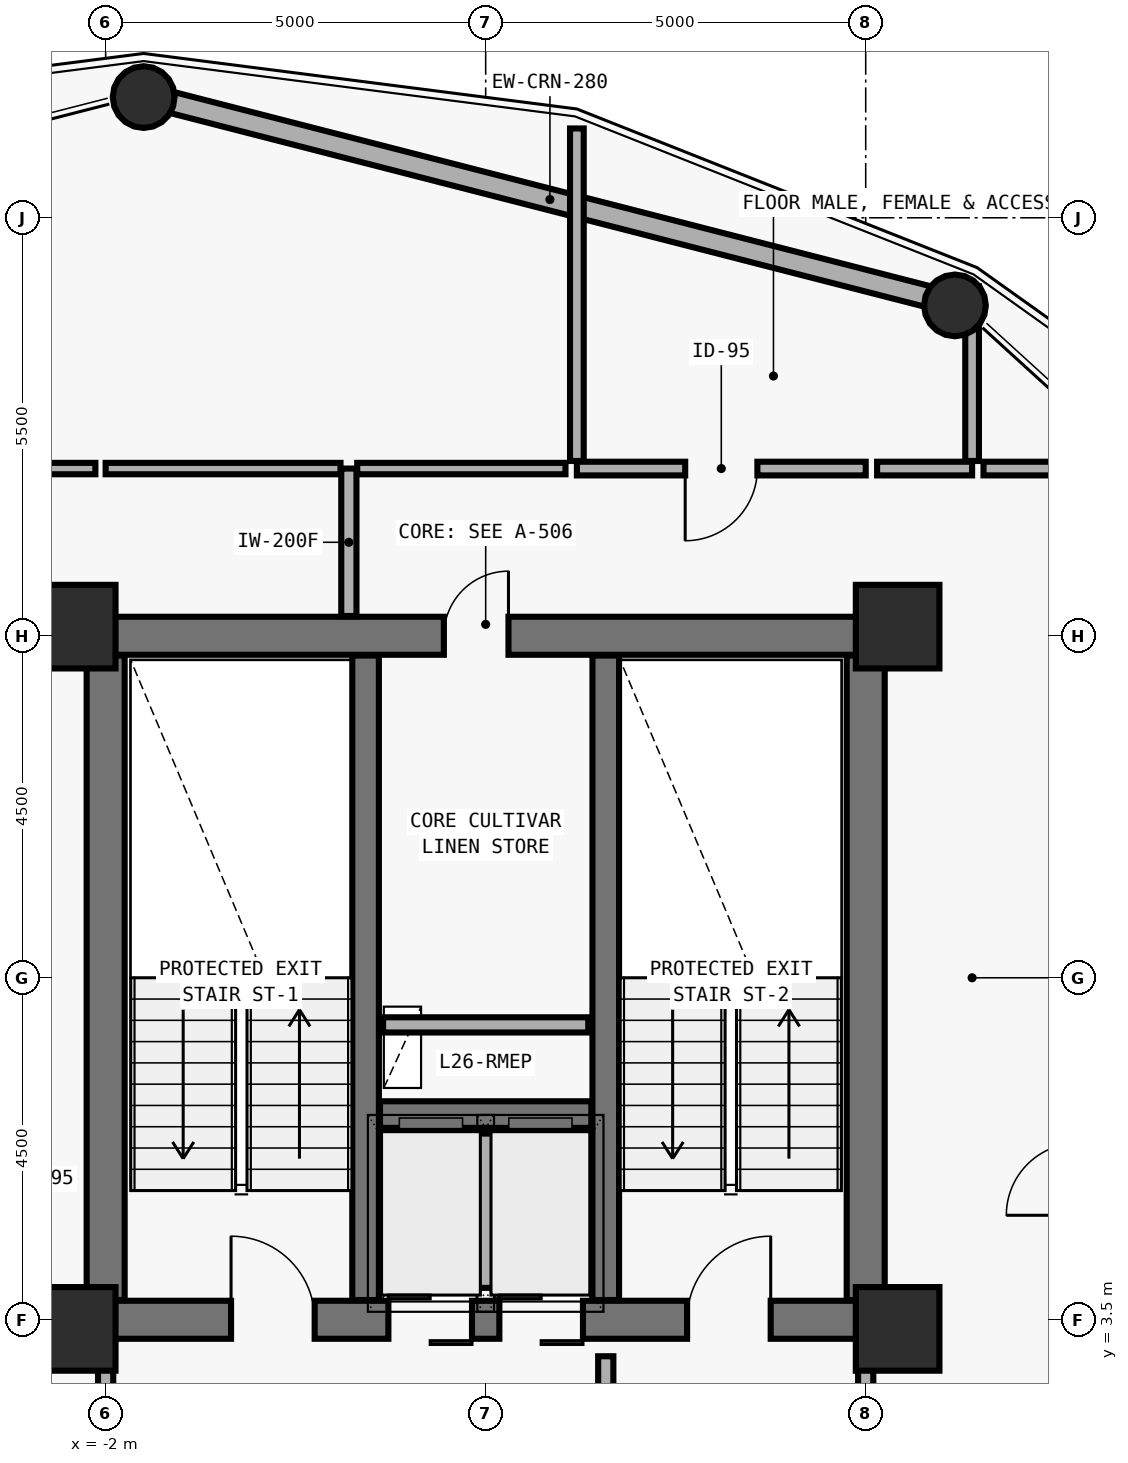
"""IFC4 building model, lengths in metres.
Left out: names, types, materials, properties, quantities, classifications, styles, units other than length and angle.
Written with IfcOpenShell. Run it as: python <this file> out.ifc"""

import sys

from ifc_helpers import new_model, si_unit, direction, frame, frame_2d, origin, origin_2d, place, context, subcontext, project, spatial, rectangle, hollow_circle, extrude, element, fill, save


model = new_model("IFC4")
c1 = context("Model", 3, precision=1e-05, world=origin(), true_north=direction((0.0, 1.0)))
c2 = subcontext(c1, "Body", "Model", "MODEL_VIEW")
j1 = project(units=[si_unit("LENGTHUNIT", "METRE"), si_unit("PLANEANGLEUNIT", "RADIAN")], contexts=[c1])
p1 = place(None, origin())
s1 = spatial("IfcSite", under=j1, at=p1, CompositionType="ELEMENT")
p2 = place(p1, origin())
s2 = spatial("IfcBuilding", under=s1, at=p2, CompositionType="ELEMENT")
p3 = place(p2, frame((0.0, 0.0, 107.1)))
s3 = spatial("IfcBuildingStorey", under=s2, at=p3, CompositionType="ELEMENT", Elevation=107.1)
p4 = place(p3, frame((-2.0, 3.5, 0.0), z_axis=(0.0, 0.0, 1.0), x_axis=(1.0, 0.0, 0.0)))
e1 = element("IfcWall", 1, at=p4, inside=s3, PredefinedType="SHEAR", context=c2, shape_type="SweptSolid", body=[
    extrude(rectangle(XDim=10.0, YDim=0.5, at=frame_2d((5.0, 0.0))), origin(), (0.0, 0.0, 1.0), 3.892),
])
p5 = place(p4, frame((1.65, 0.0, 0.0)))
e2 = element("IfcOpeningElement", 2, at=p5, cuts=e1, PredefinedType="OPENING", context=c2, shape_type="SweptSolid", body=[
    extrude(rectangle(XDim=1.1, YDim=2.15, at=frame_2d((0.55, 1.075))), frame((0.0, 0.26, 0.0), z_axis=(0.0, -1.0, 0.0), x_axis=(1.0, 0.0, 0.0)), (0.0, 0.0, 1.0), 0.52),
])
p6 = place(p4, frame((7.65, 0.0, 0.0)))
e3 = element("IfcOpeningElement", 3, at=p6, cuts=e1, PredefinedType="OPENING", context=c2, shape_type="SweptSolid", body=[
    extrude(rectangle(XDim=1.1, YDim=2.15, at=frame_2d((0.55, 1.075))), frame((0.0, 0.26, 0.0), z_axis=(0.0, -1.0, 0.0), x_axis=(1.0, 0.0, 0.0)), (0.0, 0.0, 1.0), 0.52),
])
p7 = place(p4, frame((3.72, 0.0, 0.0)))
e4 = element("IfcOpeningElement", 4, at=p7, cuts=e1, PredefinedType="OPENING", context=c2, shape_type="SweptSolid", body=[
    extrude(rectangle(XDim=1.1, YDim=2.2, at=frame_2d((0.55, 1.1))), frame((0.0, 0.26, 0.0), z_axis=(0.0, -1.0, 0.0), x_axis=(1.0, 0.0, 0.0)), (0.0, 0.0, 1.0), 0.52),
])
p8 = place(p4, frame((5.18, 0.0, 0.0)))
e5 = element("IfcOpeningElement", 5, at=p8, cuts=e1, PredefinedType="OPENING", context=c2, shape_type="SweptSolid", body=[
    extrude(rectangle(XDim=1.1, YDim=2.2, at=frame_2d((0.55, 1.1))), frame((0.0, 0.26, 0.0), z_axis=(0.0, -1.0, 0.0), x_axis=(1.0, 0.0, 0.0)), (0.0, 0.0, 1.0), 0.52),
])
p9 = place(p3, frame((-2.0, 12.5, 0.0), z_axis=(0.0, 0.0, 1.0), x_axis=(1.0, 0.0, 0.0)))
e6 = element("IfcWall", 6, at=p9, inside=s3, PredefinedType="SHEAR", context=c2, shape_type="SweptSolid", body=[
    extrude(rectangle(XDim=10.0, YDim=0.5, at=frame_2d((5.0, 0.0))), origin(), (0.0, 0.0, 1.0), 3.892),
])
p10 = place(p9, frame((4.45, 0.0, 0.0)))
e7 = element("IfcOpeningElement", 7, at=p10, cuts=e6, PredefinedType="OPENING", context=c2, shape_type="SweptSolid", body=[
    extrude(rectangle(XDim=0.85, YDim=2.1, at=frame_2d((0.425, 1.05))), frame((0.0, 0.26, 0.0), z_axis=(0.0, -1.0, 0.0), x_axis=(1.0, 0.0, 0.0)), (0.0, 0.0, 1.0), 0.52),
])
for number, where, z_axis, x_axis in (
    (8, (-2.0, 3.76, 0.0), (0.0, 0.0, 1.0), (0.0, 1.0, 0.0)),
    (9, (8.0, 3.76, 0.0), (0.0, 0.0, 1.0), (0.0, 1.0, 0.0)),
):
    element("IfcWall", number, at=place(p3, frame(where, z_axis=z_axis, x_axis=x_axis)), inside=s3, PredefinedType="SHEAR", context=c2, shape_type="SweptSolid", body=[
        extrude(rectangle(XDim=8.48, YDim=0.5, at=frame_2d((4.24, 0.0))), origin(), (0.0, 0.0, 1.0), 3.892),
    ])
for number, where, z_axis, x_axis in (
    (10, (1.42, 3.76, 0.0), (0.0, 0.0, 1.0), (0.0, 1.0, 0.0)),
    (11, (4.58, 3.76, 0.0), (0.0, 0.0, 1.0), (0.0, 1.0, 0.0)),
):
    element("IfcWall", number, at=place(p3, frame(where, z_axis=z_axis, x_axis=x_axis)), inside=s3, PredefinedType="SHEAR", context=c2, shape_type="SweptSolid", body=[
        extrude(rectangle(XDim=8.48, YDim=0.35, at=frame_2d((4.24, 0.0))), origin(), (0.0, 0.0, 1.0), 3.892),
    ])
p11 = place(p3, frame((1.61, 6.2, 0.0), z_axis=(0.0, 0.0, 1.0), x_axis=(1.0, 0.0, 0.0)))
e12 = element("IfcWall", 12, at=p11, inside=s3, PredefinedType="SHEAR", context=c2, shape_type="SweptSolid", body=[
    extrude(rectangle(XDim=2.78, YDim=0.35, at=frame_2d((1.39, 0.0))), origin(), (0.0, 0.0, 1.0), 3.892),
])
for number, where, z_axis, x_axis in (
    (13, (-2.42, 12.62, 0.0), (0.0, 0.0, 1.0), (1.0, 0.0, 0.0)),
    (14, (8.42, 12.62, 0.0), (0.0, 0.0, 1.0), (1.0, 0.0, 0.0)),
    (15, (-2.42, 3.38, 0.0), (0.0, 0.0, 1.0), (1.0, 0.0, 0.0)),
    (16, (8.42, 3.38, 0.0), (0.0, 0.0, 1.0), (1.0, 0.0, 0.0)),
):
    element("IfcColumn", number, at=place(p3, frame(where, z_axis=z_axis, x_axis=x_axis)), inside=s3, PredefinedType="COLUMN", context=c2, shape_type="SweptSolid", body=[
        extrude(rectangle(XDim=1.1, YDim=1.1, at=origin_2d()), origin(), (0.0, 0.0, 1.0), 3.875),
    ])
p12 = place(p3, frame((9.191, 16.868, 0.0), z_axis=(-0.008630730053, -0.010772663059, 0.999904725576), x_axis=(0.780423354579, -0.625251459517, 0.0)))
e17 = element("IfcColumn", 17, at=p12, inside=s3, PredefinedType="COLUMN", context=c2, shape_type="SweptSolid", body=[
    extrude(hollow_circle(Radius=0.406, WallThickness=0.03, at=origin_2d()), origin(), (0.0, 0.0, 1.0), 3.875),
])
p13 = place(p3, frame((-1.5, 19.612, 0.0), z_axis=(0.0, -0.01241083843, 0.999922982579), x_axis=(1.0, 0.0, 0.0)))
e18 = element("IfcColumn", 18, at=p13, inside=s3, PredefinedType="COLUMN", context=c2, shape_type="SweptSolid", body=[
    extrude(hollow_circle(Radius=0.406, WallThickness=0.03, at=origin_2d()), origin(), (0.0, 0.0, 1.0), 3.875),
])
p14 = place(p3, frame((-1.15, 19.522, 0.0), z_axis=(0.0, 0.0, 1.0), x_axis=(0.96859447041, -0.248645836265, 0.0)))
e19 = element("IfcWall", 19, at=p14, inside=s3, PredefinedType="SOLIDWALL", context=c2, shape_type="SweptSolid", body=[
    extrude(rectangle(XDim=10.315, YDim=0.28, at=frame_2d((5.157, 0.0))), origin(), (0.0, 0.0, 1.0), 3.11),
])
p15 = place(p3, frame((3.0, 3.92, 0.0), z_axis=(0.0, 0.0, 1.0), x_axis=(0.0, 1.0, 0.0)))
e20 = element("IfcWall", 20, at=p15, inside=s3, PredefinedType="SOLIDWALL", context=c2, shape_type="SweptSolid", body=[
    extrude(rectangle(XDim=2.03, YDim=0.2, at=frame_2d((1.015, 0.0))), origin(), (0.0, 0.0, 1.0), 3.64),
])
p16 = place(p3, frame((1.65, 7.38, 0.0), z_axis=(0.0, 0.0, 1.0), x_axis=(1.0, 0.0, 0.0)))
e21 = element("IfcWall", 21, at=p16, inside=s3, PredefinedType="SOLIDWALL", context=c2, shape_type="SweptSolid", body=[
    extrude(rectangle(XDim=2.7, YDim=0.2, at=frame_2d((1.35, 0.0))), origin(), (0.0, 0.0, 1.0), 3.64),
])
p17 = place(p3, frame((4.58, 0.83, 0.0), z_axis=(0.0, 0.0, 1.0), x_axis=(0.0, 1.0, 0.0)))
e22 = element("IfcWall", 22, at=p17, inside=s3, PredefinedType="MOVABLE", context=c2, shape_type="SweptSolid", body=[
    extrude(rectangle(XDim=2.19, YDim=0.2, at=frame_2d((1.095, 0.0))), origin(), (0.0, 0.0, 1.0), 3.64),
])
p18 = place(p17, frame((0.66, 0.0, 0.0)))
e23 = element("IfcOpeningElement", 23, at=p18, cuts=e22, PredefinedType="OPENING", context=c2, shape_type="SweptSolid", body=[
    extrude(rectangle(XDim=1.0, YDim=2.1, at=frame_2d((0.5, 1.05))), frame((0.0, 0.11, 0.0), z_axis=(0.0, -1.0, 0.0), x_axis=(1.0, 0.0, 0.0)), (0.0, 0.0, 1.0), 0.22),
])
p19 = place(p3, frame((-2.0, 0.72, 0.0), z_axis=(0.0, 0.0, 1.0), x_axis=(0.0, 1.0, 0.0)))
e24 = element("IfcWall", 24, at=p19, inside=s3, PredefinedType="MOVABLE", context=c2, shape_type="SweptSolid", body=[
    extrude(rectangle(XDim=2.3, YDim=0.2, at=frame_2d((1.15, 0.0))), origin(), (0.0, 0.0, 1.0), 2.872),
])
p20 = place(p19, frame((0.845, 0.0, 0.0)))
e25 = element("IfcOpeningElement", 25, at=p20, cuts=e24, PredefinedType="OPENING", context=c2, shape_type="SweptSolid", body=[
    extrude(rectangle(XDim=0.85, YDim=2.1, at=frame_2d((0.425, 1.05))), frame((0.0, 0.11, 0.0), z_axis=(0.0, -1.0, 0.0), x_axis=(1.0, 0.0, 0.0)), (0.0, 0.0, 1.0), 0.22),
])
p21 = place(p3, frame((8.0, 0.72, 0.0), z_axis=(0.0, 0.0, 1.0), x_axis=(0.0, 1.0, 0.0)))
e26 = element("IfcWall", 26, at=p21, inside=s3, PredefinedType="MOVABLE", context=c2, shape_type="SweptSolid", body=[
    extrude(rectangle(XDim=2.3, YDim=0.2, at=frame_2d((1.15, 0.0))), origin(), (0.0, 0.0, 1.0), 2.872),
])
p22 = place(p21, frame((0.845, 0.0, 0.0)))
e27 = element("IfcOpeningElement", 27, at=p22, cuts=e26, PredefinedType="OPENING", context=c2, shape_type="SweptSolid", body=[
    extrude(rectangle(XDim=0.85, YDim=2.1, at=frame_2d((0.425, 1.05))), frame((0.0, 0.11, 0.0), z_axis=(0.0, -1.0, 0.0), x_axis=(1.0, 0.0, 0.0)), (0.0, 0.0, 1.0), 0.22),
])
p23 = place(p3, frame((8.0, 14.7, 0.0), z_axis=(0.0, 0.0, 1.0), x_axis=(-1.0, 0.0, 0.0)))
e28 = element("IfcWall", 28, at=p23, inside=s3, PredefinedType="PLUMBINGWALL", context=c2, shape_type="SweptSolid", body=[
    extrude(rectangle(XDim=3.8, YDim=0.18, at=frame_2d((1.9, 0.0))), origin(), (0.0, 0.0, 1.0), 3.172),
])
p24 = place(p23, frame((1.425, 0.0, 0.0)))
e29 = element("IfcOpeningElement", 29, at=p24, cuts=e28, PredefinedType="OPENING", context=c2, shape_type="SweptSolid", body=[
    extrude(rectangle(XDim=0.95, YDim=2.1, at=frame_2d((0.475, 1.05))), frame((0.0, 0.1, 0.0), z_axis=(0.0, -1.0, 0.0), x_axis=(1.0, 0.0, 0.0)), (0.0, 0.0, 1.0), 0.2),
])
p25 = place(p3, frame((1.2, 14.7, 0.0), z_axis=(0.0, 0.0, 1.0), x_axis=(0.0, -1.0, 0.0)))
e30 = element("IfcWall", 30, at=p25, inside=s3, PredefinedType="MOVABLE", context=c2, shape_type="SweptSolid", body=[
    extrude(rectangle(XDim=1.94, YDim=0.2, at=frame_2d((0.97, 0.0))), origin(), (0.0, 0.0, 1.0), 3.64),
])
p26 = place(p3, frame((9.4, 14.7, 0.0), z_axis=(0.0, 0.0, 1.0), x_axis=(-1.0, 0.0, 0.0)))
e31 = element("IfcWall", 31, at=p26, inside=s3, PredefinedType="PLUMBINGWALL", context=c2, shape_type="SweptSolid", body=[
    extrude(rectangle(XDim=1.25, YDim=0.18, at=frame_2d((0.625, 0.0))), origin(), (0.0, 0.0, 1.0), 3.172),
])
p27 = place(p3, frame((1.09, 14.7, 0.0), z_axis=(0.0, 0.0, 1.0), x_axis=(-1.0, 0.0, 0.0)))
e32 = element("IfcWall", 32, at=p27, inside=s3, PredefinedType="PARTITIONING", context=c2, shape_type="SweptSolid", body=[
    extrude(rectangle(XDim=3.09, YDim=0.15, at=frame_2d((1.545, 0.0))), origin(), (0.0, 0.0, 1.0), 3.64),
])
p28 = place(p3, frame((-2.135, 14.7, 0.0), z_axis=(0.0, 0.0, 1.0), x_axis=(-1.0, 0.0, 0.0)))
e33 = element("IfcWall", 33, at=p28, inside=s3, PredefinedType="PARTITIONING", context=c2, shape_type="SweptSolid", body=[
    extrude(rectangle(XDim=2.465, YDim=0.15, at=frame_2d((1.232, 0.0))), origin(), (0.0, 0.0, 1.0), 3.172),
])
p29 = place(p3, frame((4.05, 14.7, 0.0), z_axis=(0.0, 0.0, 1.0), x_axis=(-1.0, 0.0, 0.0)))
e34 = element("IfcWall", 34, at=p29, inside=s3, PredefinedType="PARTITIONING", context=c2, shape_type="SweptSolid", body=[
    extrude(rectangle(XDim=2.74, YDim=0.15, at=frame_2d((1.37, 0.0))), origin(), (0.0, 0.0, 1.0), 3.172),
])
p30 = place(p3, frame((4.2, 19.175, 0.0), z_axis=(0.0, 0.0, 1.0), x_axis=(0.0, -1.0, 0.0)))
e35 = element("IfcWall", 35, at=p30, inside=s3, PredefinedType="PLUMBINGWALL", context=c2, shape_type="SweptSolid", body=[
    extrude(rectangle(XDim=4.375, YDim=0.18, at=frame_2d((2.188, 0.0))), origin(), (0.0, 0.0, 1.0), 3.64),
])
p31 = place(p3, frame((10.7, 14.7, 0.0), z_axis=(0.0, 0.0, 1.0), x_axis=(-1.0, 0.0, 0.0)))
e36 = element("IfcWall", 36, at=p31, inside=s3, PredefinedType="PLUMBINGWALL", context=c2, shape_type="SweptSolid", body=[
    extrude(rectangle(XDim=1.15, YDim=0.18, at=frame_2d((0.575, 0.0))), origin(), (0.0, 0.0, 1.0), 3.64),
])
p32 = place(p3, frame((9.4, 14.8, 0.0), z_axis=(0.0, 0.0, 1.0), x_axis=(0.0, 1.0, 0.0)))
e37 = element("IfcWall", 37, at=p32, inside=s3, PredefinedType="PLUMBINGWALL", context=c2, shape_type="SweptSolid", body=[
    extrude(rectangle(XDim=2.298, YDim=0.18, at=frame_2d((1.149, 0.0))), origin(), (0.0, 0.0, 1.0), 3.022),
])
p33 = place(p5, origin())
e38 = element("IfcDoor", 38, at=p33, inside=s3, OperationType="SINGLE_SWING_LEFT", PredefinedType="DOOR", context=c2, shape_type="SweptSolid", body=[
    extrude(rectangle(XDim=1.1, YDim=2.15, at=frame_2d((0.55, 1.075))), frame((0.0, 0.025, 0.0), z_axis=(0.0, -1.0, 0.0), x_axis=(1.0, 0.0, 0.0)), (0.0, 0.0, 1.0), 0.05),
])
fill(e2, e38)
p34 = place(p6, origin())
e39 = element("IfcDoor", 39, at=p34, inside=s3, OperationType="SINGLE_SWING_RIGHT", PredefinedType="DOOR", context=c2, shape_type="SweptSolid", body=[
    extrude(rectangle(XDim=1.1, YDim=2.15, at=frame_2d((0.55, 1.075))), frame((0.0, 0.025, 0.0), z_axis=(0.0, -1.0, 0.0), x_axis=(1.0, 0.0, 0.0)), (0.0, 0.0, 1.0), 0.05),
])
fill(e3, e39)
p35 = place(p7, origin())
e40 = element("IfcDoor", 40, at=p35, inside=s3, OperationType="DOUBLE_DOOR_SLIDING", PredefinedType="DOOR", context=c2, shape_type="SweptSolid", body=[
    extrude(rectangle(XDim=1.1, YDim=2.2, at=frame_2d((0.55, 1.1))), frame((0.0, 0.025, 0.0), z_axis=(0.0, -1.0, 0.0), x_axis=(1.0, 0.0, 0.0)), (0.0, 0.0, 1.0), 0.05),
])
fill(e4, e40)
p36 = place(p8, origin())
e41 = element("IfcDoor", 41, at=p36, inside=s3, OperationType="DOUBLE_DOOR_SLIDING", PredefinedType="DOOR", context=c2, shape_type="SweptSolid", body=[
    extrude(rectangle(XDim=1.1, YDim=2.2, at=frame_2d((0.55, 1.1))), frame((0.0, 0.025, 0.0), z_axis=(0.0, -1.0, 0.0), x_axis=(1.0, 0.0, 0.0)), (0.0, 0.0, 1.0), 0.05),
])
fill(e5, e41)
p37 = place(p10, origin())
e42 = element("IfcDoor", 42, at=p37, inside=s3, OperationType="SINGLE_SWING_RIGHT", PredefinedType="DOOR", context=c2, shape_type="SweptSolid", body=[
    extrude(rectangle(XDim=0.85, YDim=2.1, at=frame_2d((0.425, 1.05))), frame((0.0, 0.025, 0.0), z_axis=(0.0, -1.0, 0.0), x_axis=(1.0, 0.0, 0.0)), (0.0, 0.0, 1.0), 0.05),
])
fill(e7, e42)
p38 = place(p24, origin())
e43 = element("IfcDoor", 43, at=p38, inside=s3, OperationType="SINGLE_SWING_RIGHT", PredefinedType="DOOR", context=c2, shape_type="SweptSolid", body=[
    extrude(rectangle(XDim=0.95, YDim=2.1, at=frame_2d((0.475, 1.05))), frame((0.0, 0.025, 0.0), z_axis=(0.0, -1.0, 0.0), x_axis=(1.0, 0.0, 0.0)), (0.0, 0.0, 1.0), 0.05),
])
fill(e29, e43)
save(model, sys.argv[1])
